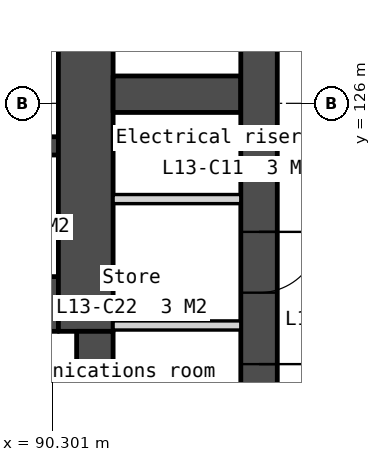
"""IFC4 building model, lengths in metres.
Left out: names, types, materials, properties, quantities, classifications, styles, units other than length and angle.
Written with IfcOpenShell. Run it as: python <this file> out.ifc"""

import sys

from ifc_helpers import new_model, si_unit, direction, frame, frame_2d, origin, place, context, subcontext, project, spatial, polyline, rectangle, outline, extrude, element, fill, save


model = new_model("IFC4")
c1 = context("Model", 3, precision=1e-05, world=origin(), true_north=direction((0.0, 1.0)))
c2 = subcontext(c1, "Body", "Model", "MODEL_VIEW")
j1 = project(units=[si_unit("LENGTHUNIT", "METRE"), si_unit("PLANEANGLEUNIT", "RADIAN")], contexts=[c1])
p1 = place(None, origin())
s1 = spatial("IfcSite", under=j1, at=p1, CompositionType="ELEMENT")
p2 = place(p1, origin())
s2 = spatial("IfcBuilding", under=s1, at=p2, CompositionType="ELEMENT")
p3 = place(p2, frame((0.0, 0.0, 59.5)))
s3 = spatial("IfcBuildingStorey", under=s2, at=p3, CompositionType="ELEMENT", Elevation=59.5)
p4 = place(p3, frame((87.85, 125.3, 0.0), z_axis=(0.0, 0.0, 1.0), x_axis=(1.0, 0.0, 0.0)))
e1 = element("IfcWall", 1, at=p4, inside=s3, PredefinedType="SOLIDWALL", context=c2, shape_type="SweptSolid", body=[
    extrude(rectangle(XDim=2.55, YDim=0.3, at=frame_2d((1.275, 0.0))), origin(), (0.0, 0.0, 1.0), 3.35),
])
p5 = place(p3, frame((87.85, 122.7, 0.0), z_axis=(0.0, 0.0, 1.0), x_axis=(1.0, 0.0, 0.0)))
e2 = element("IfcWall", 2, at=p5, inside=s3, PredefinedType="SOLIDWALL", context=c2, shape_type="SweptSolid", body=[
    extrude(rectangle(XDim=2.55, YDim=0.9, at=frame_2d((1.275, 0.0))), origin(), (0.0, 0.0, 1.0), 3.35),
])
p6 = place(p3, frame((90.85, 133.95, 0.0), z_axis=(0.0, 0.0, 1.0), x_axis=(0.0, -1.0, 0.0)))
e3 = element("IfcWall", 3, at=p6, inside=s3, PredefinedType="SOLIDWALL", context=c2, shape_type="SweptSolid", body=[
    extrude(rectangle(XDim=11.7, YDim=0.9, at=frame_2d((5.85, 0.0))), origin(), (0.0, 0.0, 1.0), 3.35),
])
p7 = place(p3, frame((91.0, 122.25, 0.0), z_axis=(0.0, 0.0, 1.0), x_axis=(0.0, -1.0, 0.0)))
e4 = element("IfcWall", 4, at=p7, inside=s3, PredefinedType="SOLIDWALL", context=c2, shape_type="SweptSolid", body=[
    extrude(rectangle(XDim=2.1, YDim=0.6, at=frame_2d((1.05, 0.0))), origin(), (0.0, 0.0, 1.0), 3.35),
])
p8 = place(p3, frame((91.3, 126.15, 0.0), z_axis=(0.0, 0.0, 1.0), x_axis=(1.0, 0.0, 0.0)))
e5 = element("IfcWall", 5, at=p8, inside=s3, PredefinedType="SOLIDWALL", context=c2, shape_type="SweptSolid", body=[
    extrude(rectangle(XDim=2.1, YDim=0.6, at=frame_2d((1.05, 0.0))), origin(), (0.0, 0.0, 1.0), 3.35),
])
for number, where, z_axis, x_axis in (
    (6, (91.3, 124.425, 0.0), (0.0, 0.0, 1.0), (1.0, 0.0, 0.0)),
    (7, (91.3, 122.346, 0.0), (0.0, 0.0, 1.0), (1.0, 0.0, 0.0)),
):
    element("IfcWall", number, at=place(p3, frame(where, z_axis=z_axis, x_axis=x_axis)), inside=s3, PredefinedType="PARTITIONING", context=c2, shape_type="SweptSolid", body=[
        extrude(rectangle(XDim=2.1, YDim=0.15, at=frame_2d((1.05, 0.0))), origin(), (0.0, 0.0, 1.0), 3.35),
    ])
p9 = place(p3, frame((93.7, 133.95, 0.0), z_axis=(0.0, 0.0, 1.0), x_axis=(0.0, -1.0, 0.0)))
e8 = element("IfcWall", 8, at=p9, inside=s3, PredefinedType="SOLIDWALL", context=c2, shape_type="SweptSolid", body=[
    extrude(rectangle(XDim=13.8, YDim=0.6, at=frame_2d((6.9, 0.0))), origin(), (0.0, 0.0, 1.0), 3.35),
])
p10 = place(p9, frame((0.6, 0.0, 0.0)))
e9 = element("IfcOpeningElement", 9, at=p10, cuts=e8, PredefinedType="OPENING", context=c2, shape_type="SweptSolid", body=[
    extrude(rectangle(XDim=1.1, YDim=2.1, at=frame_2d((0.55, 1.05))), frame((0.0, 0.31, 0.0), z_axis=(0.0, -1.0, 0.0), x_axis=(1.0, 0.0, 0.0)), (0.0, 0.0, 1.0), 0.62),
])
p11 = place(p9, frame((10.064, 0.0, 0.0)))
e10 = element("IfcOpeningElement", 10, at=p11, cuts=e8, PredefinedType="OPENING", context=c2, shape_type="SweptSolid", body=[
    extrude(rectangle(XDim=1.0, YDim=2.1, at=frame_2d((0.5, 1.05))), frame((0.0, 0.31, 0.0), z_axis=(0.0, -1.0, 0.0), x_axis=(1.0, 0.0, 0.0)), (0.0, 0.0, 1.0), 0.62),
])
p12 = place(p9, frame((8.35, 0.0, 0.0)))
e11 = element("IfcOpeningElement", 11, at=p12, cuts=e8, PredefinedType="OPENING", context=c2, shape_type="SweptSolid", body=[
    extrude(rectangle(XDim=0.85, YDim=2.1, at=frame_2d((0.425, 1.05))), frame((0.0, 0.31, 0.0), z_axis=(0.0, -1.0, 0.0), x_axis=(1.0, 0.0, 0.0)), (0.0, 0.0, 1.0), 0.62),
])
p13 = place(p9, frame((12.239, 0.0, 0.0)))
e12 = element("IfcOpeningElement", 12, at=p13, cuts=e8, PredefinedType="OPENING", context=c2, shape_type="SweptSolid", body=[
    extrude(rectangle(XDim=1.0, YDim=2.1, at=frame_2d((0.5, 1.05))), frame((0.0, 0.31, 0.0), z_axis=(0.0, -1.0, 0.0), x_axis=(1.0, 0.0, 0.0)), (0.0, 0.0, 1.0), 0.62),
])
p14 = place(p3, frame((83.105, 90.599, -0.15), z_axis=(0.0, 0.0, 1.0), x_axis=(0.499999201451, 0.866025864826, 0.0)))
e13 = element("IfcWall", 13, at=p14, inside=s3, PredefinedType="SOLIDWALL", context=c2, shape_type="SweptSolid", body=[
    extrude(outline(polyline([(44.8, 0.0), (44.8, 3.5), (0.0, 3.5), (0.0, 0.0), (44.8, 0.0)])), frame((0.0, 0.225, 0.0), z_axis=(0.0, -1.0, 0.0), x_axis=(1.0, 0.0, 0.0)), (0.0, 0.0, 1.0), 0.45),
])
p15 = place(p14, frame((3.03, 0.0, 1.05)))
e14 = element("IfcOpeningElement", 14, at=p15, cuts=e13, PredefinedType="OPENING", context=c2, shape_type="SweptSolid", body=[
    extrude(rectangle(XDim=1.2, YDim=1.5, at=frame_2d((0.6, 0.75))), frame((0.0, 0.235, 0.0), z_axis=(0.0, -1.0, 0.0), x_axis=(1.0, 0.0, 0.0)), (0.0, 0.0, 1.0), 0.47),
])
p16 = place(p14, frame((4.73, 0.0, 1.05)))
e15 = element("IfcOpeningElement", 15, at=p16, cuts=e13, PredefinedType="OPENING", context=c2, shape_type="SweptSolid", body=[
    extrude(rectangle(XDim=1.2, YDim=1.5, at=frame_2d((0.6, 0.75))), frame((0.0, 0.235, 0.0), z_axis=(0.0, -1.0, 0.0), x_axis=(1.0, 0.0, 0.0)), (0.0, 0.0, 1.0), 0.47),
])
p17 = place(p14, frame((11.99, 0.0, 1.05)))
e16 = element("IfcOpeningElement", 16, at=p17, cuts=e13, PredefinedType="OPENING", context=c2, shape_type="SweptSolid", body=[
    extrude(rectangle(XDim=1.2, YDim=1.5, at=frame_2d((0.6, 0.75))), frame((0.0, 0.235, 0.0), z_axis=(0.0, -1.0, 0.0), x_axis=(1.0, 0.0, 0.0)), (0.0, 0.0, 1.0), 0.47),
])
p18 = place(p14, frame((13.69, 0.0, 1.05)))
e17 = element("IfcOpeningElement", 17, at=p18, cuts=e13, PredefinedType="OPENING", context=c2, shape_type="SweptSolid", body=[
    extrude(rectangle(XDim=1.2, YDim=1.5, at=frame_2d((0.6, 0.75))), frame((0.0, 0.235, 0.0), z_axis=(0.0, -1.0, 0.0), x_axis=(1.0, 0.0, 0.0)), (0.0, 0.0, 1.0), 0.47),
])
p19 = place(p14, frame((20.95, 0.0, 1.05)))
e18 = element("IfcOpeningElement", 18, at=p19, cuts=e13, PredefinedType="OPENING", context=c2, shape_type="SweptSolid", body=[
    extrude(rectangle(XDim=1.2, YDim=1.5, at=frame_2d((0.6, 0.75))), frame((0.0, 0.235, 0.0), z_axis=(0.0, -1.0, 0.0), x_axis=(1.0, 0.0, 0.0)), (0.0, 0.0, 1.0), 0.47),
])
p20 = place(p14, frame((22.65, 0.0, 1.05)))
e19 = element("IfcOpeningElement", 19, at=p20, cuts=e13, PredefinedType="OPENING", context=c2, shape_type="SweptSolid", body=[
    extrude(rectangle(XDim=1.2, YDim=1.5, at=frame_2d((0.6, 0.75))), frame((0.0, 0.235, 0.0), z_axis=(0.0, -1.0, 0.0), x_axis=(1.0, 0.0, 0.0)), (0.0, 0.0, 1.0), 0.47),
])
p21 = place(p14, frame((29.91, 0.0, 1.05)))
e20 = element("IfcOpeningElement", 20, at=p21, cuts=e13, PredefinedType="OPENING", context=c2, shape_type="SweptSolid", body=[
    extrude(rectangle(XDim=1.2, YDim=1.5, at=frame_2d((0.6, 0.75))), frame((0.0, 0.235, 0.0), z_axis=(0.0, -1.0, 0.0), x_axis=(1.0, 0.0, 0.0)), (0.0, 0.0, 1.0), 0.47),
])
p22 = place(p14, frame((31.61, 0.0, 1.05)))
e21 = element("IfcOpeningElement", 21, at=p22, cuts=e13, PredefinedType="OPENING", context=c2, shape_type="SweptSolid", body=[
    extrude(rectangle(XDim=1.2, YDim=1.5, at=frame_2d((0.6, 0.75))), frame((0.0, 0.235, 0.0), z_axis=(0.0, -1.0, 0.0), x_axis=(1.0, 0.0, 0.0)), (0.0, 0.0, 1.0), 0.47),
])
p23 = place(p14, frame((38.87, 0.0, 1.05)))
e22 = element("IfcOpeningElement", 22, at=p23, cuts=e13, PredefinedType="OPENING", context=c2, shape_type="SweptSolid", body=[
    extrude(rectangle(XDim=1.2, YDim=1.5, at=frame_2d((0.6, 0.75))), frame((0.0, 0.235, 0.0), z_axis=(0.0, -1.0, 0.0), x_axis=(1.0, 0.0, 0.0)), (0.0, 0.0, 1.0), 0.47),
])
p24 = place(p14, frame((40.57, 0.0, 1.05)))
e23 = element("IfcOpeningElement", 23, at=p24, cuts=e13, PredefinedType="OPENING", context=c2, shape_type="SweptSolid", body=[
    extrude(rectangle(XDim=1.2, YDim=1.5, at=frame_2d((0.6, 0.75))), frame((0.0, 0.235, 0.0), z_axis=(0.0, -1.0, 0.0), x_axis=(1.0, 0.0, 0.0)), (0.0, 0.0, 1.0), 0.47),
])
p25 = place(p11, origin())
e24 = element("IfcDoor", 24, at=p25, inside=s3, OperationType="SINGLE_SWING_LEFT", PredefinedType="DOOR", context=c2, shape_type="SweptSolid", body=[
    extrude(rectangle(XDim=1.0, YDim=2.1, at=frame_2d((0.5, 1.05))), frame((0.0, 0.025, 0.0), z_axis=(0.0, -1.0, 0.0), x_axis=(1.0, 0.0, 0.0)), (0.0, 0.0, 1.0), 0.05),
])
fill(e10, e24)
p26 = place(p12, origin())
e25 = element("IfcDoor", 25, at=p26, inside=s3, OperationType="SINGLE_SWING_LEFT", PredefinedType="DOOR", context=c2, shape_type="SweptSolid", body=[
    extrude(rectangle(XDim=0.85, YDim=2.1, at=frame_2d((0.425, 1.05))), frame((0.0, 0.025, 0.0), z_axis=(0.0, -1.0, 0.0), x_axis=(1.0, 0.0, 0.0)), (0.0, 0.0, 1.0), 0.05),
])
fill(e11, e25)
p27 = place(p13, origin())
e26 = element("IfcDoor", 26, at=p27, inside=s3, OperationType="SINGLE_SWING_LEFT", PredefinedType="DOOR", context=c2, shape_type="SweptSolid", body=[
    extrude(rectangle(XDim=1.0, YDim=2.1, at=frame_2d((0.5, 1.05))), frame((0.0, 0.025, 0.0), z_axis=(0.0, -1.0, 0.0), x_axis=(1.0, 0.0, 0.0)), (0.0, 0.0, 1.0), 0.05),
])
fill(e12, e26)
save(model, sys.argv[1])
